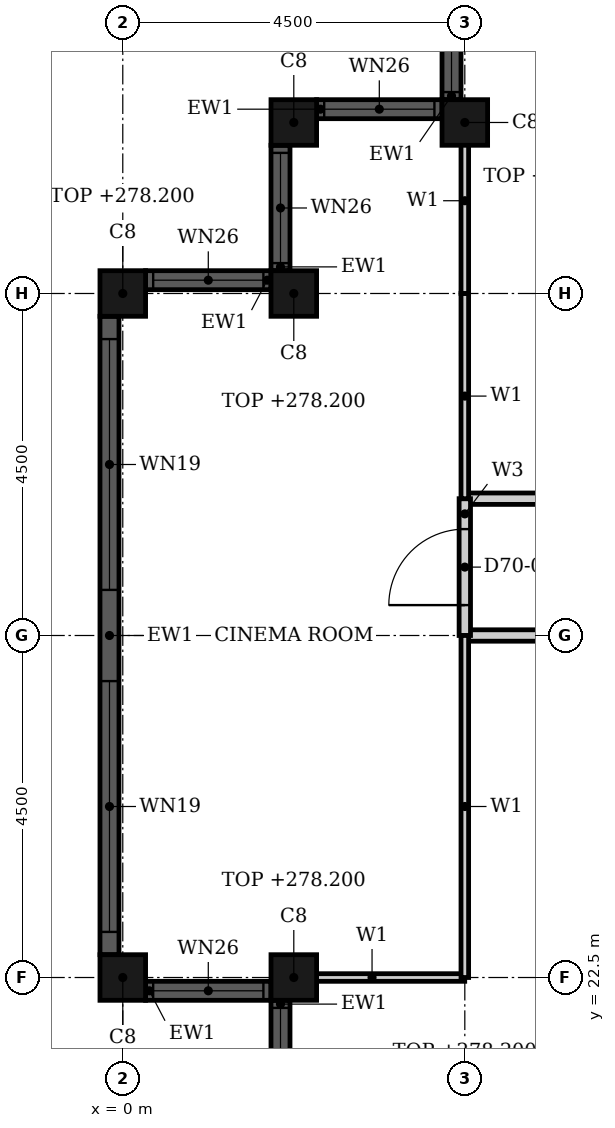
"""IFC4 building model, lengths in metres.
Left out: names, types, materials, properties, quantities, classifications, styles, units other than length and angle.
Written with IfcOpenShell. Run it as: python <this file> out.ifc"""

import sys

from ifc_helpers import new_model, si_unit, direction, frame, frame_2d, origin, origin_2d, place, context, subcontext, project, spatial, rectangle, hollow_rectangle, extrude, element, fill, save


model = new_model("IFC4")
c1 = context("Model", 3, precision=1e-05, world=origin(), true_north=direction((0.0, 1.0)))
c2 = subcontext(c1, "Body", "Model", "MODEL_VIEW")
j1 = project(units=[si_unit("LENGTHUNIT", "METRE"), si_unit("PLANEANGLEUNIT", "RADIAN")], contexts=[c1])
p1 = place(None, origin())
s1 = spatial("IfcSite", under=j1, at=p1, CompositionType="ELEMENT")
p2 = place(p1, origin())
s2 = spatial("IfcBuilding", under=s1, at=p2, CompositionType="ELEMENT")
p3 = place(p2, frame((0.0, 0.0, 274.9)))
s3 = spatial("IfcBuildingStorey", under=s2, at=p3, CompositionType="ELEMENT", Elevation=274.9)
for number, where, z_axis, x_axis in (
    (1, (4.5, 33.75, 0.0), (0.0, 0.0, 1.0), (1.0, 0.0, 0.0)),
    (2, (2.25, 33.75, 0.0), (0.0, 0.0, 1.0), (1.0, 0.0, 0.0)),
    (3, (2.25, 31.5, 0.0), (0.0, 0.0, 1.0), (1.0, 0.0, 0.0)),
    (4, (0.0, 31.5, 0.0), (0.0, 0.0, 1.0), (1.0, 0.0, 0.0)),
    (5, (0.0, 22.5, 0.0), (0.0, 0.0, 1.0), (1.0, 0.0, 0.0)),
    (6, (2.25, 22.5, 0.0), (0.0, 0.0, 1.0), (1.0, 0.0, 0.0)),
):
    element("IfcColumn", number, at=place(p3, frame(where, z_axis=z_axis, x_axis=x_axis)), inside=s3, PredefinedType="COLUMN", context=c2, shape_type="SweptSolid", body=[
        extrude(hollow_rectangle(XDim=0.6, YDim=0.6, WallThickness=0.02, at=origin_2d()), origin(), (0.0, 0.0, 1.0), 3.3),
    ])
p4 = place(p3, frame((4.325, 35.7, 0.0), z_axis=(0.0, 0.0, 1.0), x_axis=(0.0, -1.0, 0.0)))
e7 = element("IfcWall", 7, at=p4, inside=s3, PredefinedType="SOLIDWALL", context=c2, shape_type="SweptSolid", body=[
    extrude(rectangle(XDim=1.65, YDim=0.25, at=frame_2d((0.825, 0.0))), origin(), (0.0, 0.0, 1.0), 3.7),
])
p5 = place(p4, frame((0.1, 0.0, 0.9)))
e8 = element("IfcOpeningElement", 8, at=p5, cuts=e7, PredefinedType="OPENING", context=c2, shape_type="SweptSolid", body=[
    extrude(rectangle(XDim=1.45, YDim=1.75, at=frame_2d((0.725, 0.875))), frame((0.0, 0.135, 0.0), z_axis=(0.0, -1.0, 0.0), x_axis=(1.0, 0.0, 0.0)), (0.0, 0.0, 1.0), 0.27),
])
p6 = place(p3, frame((4.2, 33.925, 0.0), z_axis=(0.0, 0.0, 1.0), x_axis=(-1.0, 0.0, 0.0)))
e9 = element("IfcWall", 9, at=p6, inside=s3, PredefinedType="SOLIDWALL", context=c2, shape_type="SweptSolid", body=[
    extrude(rectangle(XDim=1.65, YDim=0.25, at=frame_2d((0.825, 0.0))), origin(), (0.0, 0.0, 1.0), 3.7),
])
p7 = place(p6, frame((0.1, 0.0, 0.9)))
e10 = element("IfcOpeningElement", 10, at=p7, cuts=e9, PredefinedType="OPENING", context=c2, shape_type="SweptSolid", body=[
    extrude(rectangle(XDim=1.45, YDim=1.75, at=frame_2d((0.725, 0.875))), frame((0.0, 0.135, 0.0), z_axis=(0.0, -1.0, 0.0), x_axis=(1.0, 0.0, 0.0)), (0.0, 0.0, 1.0), 0.27),
])
p8 = place(p3, frame((2.075, 33.45, 0.0), z_axis=(0.0, 0.0, 1.0), x_axis=(0.0, -1.0, 0.0)))
e11 = element("IfcWall", 11, at=p8, inside=s3, PredefinedType="SOLIDWALL", context=c2, shape_type="SweptSolid", body=[
    extrude(rectangle(XDim=1.65, YDim=0.25, at=frame_2d((0.825, 0.0))), origin(), (0.0, 0.0, 1.0), 3.7),
])
p9 = place(p8, frame((0.1, 0.0, 0.9)))
e12 = element("IfcOpeningElement", 12, at=p9, cuts=e11, PredefinedType="OPENING", context=c2, shape_type="SweptSolid", body=[
    extrude(rectangle(XDim=1.45, YDim=1.75, at=frame_2d((0.725, 0.875))), frame((0.0, 0.135, 0.0), z_axis=(0.0, -1.0, 0.0), x_axis=(1.0, 0.0, 0.0)), (0.0, 0.0, 1.0), 0.27),
])
p10 = place(p3, frame((1.95, 31.675, 0.0), z_axis=(0.0, 0.0, 1.0), x_axis=(-1.0, 0.0, 0.0)))
e13 = element("IfcWall", 13, at=p10, inside=s3, PredefinedType="SOLIDWALL", context=c2, shape_type="SweptSolid", body=[
    extrude(rectangle(XDim=1.65, YDim=0.25, at=frame_2d((0.825, 0.0))), origin(), (0.0, 0.0, 1.0), 3.7),
])
p11 = place(p10, frame((0.1, 0.0, 0.9)))
e14 = element("IfcOpeningElement", 14, at=p11, cuts=e13, PredefinedType="OPENING", context=c2, shape_type="SweptSolid", body=[
    extrude(rectangle(XDim=1.45, YDim=1.75, at=frame_2d((0.725, 0.875))), frame((0.0, 0.135, 0.0), z_axis=(0.0, -1.0, 0.0), x_axis=(1.0, 0.0, 0.0)), (0.0, 0.0, 1.0), 0.27),
])
p12 = place(p3, frame((-0.175, 31.2, 0.0), z_axis=(0.0, 0.0, 1.0), x_axis=(0.0, -1.0, 0.0)))
e15 = element("IfcWall", 15, at=p12, inside=s3, PredefinedType="SOLIDWALL", context=c2, shape_type="SweptSolid", body=[
    extrude(rectangle(XDim=8.4, YDim=0.25, at=frame_2d((4.2, 0.0))), origin(), (0.0, 0.0, 1.0), 3.7),
])
p13 = place(p12, frame((0.3, 0.0, 0.45)))
e16 = element("IfcOpeningElement", 16, at=p13, cuts=e15, PredefinedType="OPENING", context=c2, shape_type="SweptSolid", body=[
    extrude(rectangle(XDim=3.3, YDim=2.2, at=frame_2d((1.65, 1.1))), frame((0.0, 0.135, 0.0), z_axis=(0.0, -1.0, 0.0), x_axis=(1.0, 0.0, 0.0)), (0.0, 0.0, 1.0), 0.27),
])
p14 = place(p12, frame((4.8, 0.0, 0.45)))
e17 = element("IfcOpeningElement", 17, at=p14, cuts=e15, PredefinedType="OPENING", context=c2, shape_type="SweptSolid", body=[
    extrude(rectangle(XDim=3.3, YDim=2.2, at=frame_2d((1.65, 1.1))), frame((0.0, 0.135, 0.0), z_axis=(0.0, -1.0, 0.0), x_axis=(1.0, 0.0, 0.0)), (0.0, 0.0, 1.0), 0.27),
])
p15 = place(p3, frame((0.3, 22.325, 0.0), z_axis=(0.0, 0.0, 1.0), x_axis=(1.0, 0.0, 0.0)))
e18 = element("IfcWall", 18, at=p15, inside=s3, PredefinedType="SOLIDWALL", context=c2, shape_type="SweptSolid", body=[
    extrude(rectangle(XDim=1.65, YDim=0.25, at=frame_2d((0.825, 0.0))), origin(), (0.0, 0.0, 1.0), 3.7),
])
p16 = place(p15, frame((0.1, 0.0, 0.9)))
e19 = element("IfcOpeningElement", 19, at=p16, cuts=e18, PredefinedType="OPENING", context=c2, shape_type="SweptSolid", body=[
    extrude(rectangle(XDim=1.45, YDim=1.75, at=frame_2d((0.725, 0.875))), frame((0.0, 0.135, 0.0), z_axis=(0.0, -1.0, 0.0), x_axis=(1.0, 0.0, 0.0)), (0.0, 0.0, 1.0), 0.27),
])
p17 = place(p3, frame((2.075, 22.2, 0.0), z_axis=(0.0, 0.0, 1.0), x_axis=(0.0, -1.0, 0.0)))
e20 = element("IfcWall", 20, at=p17, inside=s3, PredefinedType="SOLIDWALL", context=c2, shape_type="SweptSolid", body=[
    extrude(rectangle(XDim=1.65, YDim=0.25, at=frame_2d((0.825, 0.0))), origin(), (0.0, 0.0, 1.0), 3.7),
])
p18 = place(p17, frame((0.1, 0.0, 0.9)))
e21 = element("IfcOpeningElement", 21, at=p18, cuts=e20, PredefinedType="OPENING", context=c2, shape_type="SweptSolid", body=[
    extrude(rectangle(XDim=1.45, YDim=1.75, at=frame_2d((0.725, 0.875))), frame((0.0, 0.135, 0.0), z_axis=(0.0, -1.0, 0.0), x_axis=(1.0, 0.0, 0.0)), (0.0, 0.0, 1.0), 0.27),
])
p19 = place(p3, frame((4.5, 27.0, 0.0), z_axis=(0.0, 0.0, 1.0), x_axis=(1.0, 0.0, 0.0)))
e22 = element("IfcWall", 22, at=p19, inside=s3, PredefinedType="PARTITIONING", context=c2, shape_type="SweptSolid", body=[
    extrude(rectangle(XDim=13.5, YDim=0.15, at=frame_2d((6.75, 0.0))), origin(), (0.0, 0.0, 1.0), 2.58),
])
p20 = place(p19, frame((5.35, 0.0, 0.0)))
e23 = element("IfcOpeningElement", 23, at=p20, cuts=e22, PredefinedType="OPENING", context=c2, shape_type="SweptSolid", body=[
    extrude(rectangle(XDim=1.0, YDim=2.1, at=frame_2d((0.5, 1.05))), frame((0.0, 0.085, 0.0), z_axis=(0.0, -1.0, 0.0), x_axis=(1.0, 0.0, 0.0)), (0.0, 0.0, 1.0), 0.17),
])
p21 = place(p3, frame((4.5, 28.8, 0.0), z_axis=(0.0, 0.0, 1.0), x_axis=(1.0, 0.0, 0.0)))
e24 = element("IfcWall", 24, at=p21, inside=s3, PredefinedType="PARTITIONING", context=c2, shape_type="SweptSolid", body=[
    extrude(rectangle(XDim=11.699, YDim=0.15, at=frame_2d((5.85, 0.0))), origin(), (0.0, 0.0, 1.0), 3.3),
])
p22 = place(p21, frame((4.0, 0.0, 0.0)))
e25 = element("IfcOpeningElement", 25, at=p22, cuts=e24, PredefinedType="OPENING", context=c2, shape_type="SweptSolid", body=[
    extrude(rectangle(XDim=1.0, YDim=2.1, at=frame_2d((0.5, 1.05))), frame((0.0, 0.085, 0.0), z_axis=(0.0, -1.0, 0.0), x_axis=(1.0, 0.0, 0.0)), (0.0, 0.0, 1.0), 0.17),
])
p23 = place(p3, frame((4.5, 27.0, 0.0), z_axis=(0.0, 0.0, 1.0), x_axis=(0.0, 1.0, 0.0)))
e26 = element("IfcWall", 26, at=p23, inside=s3, PredefinedType="PARTITIONING", context=c2, shape_type="SweptSolid", body=[
    extrude(rectangle(XDim=1.8, YDim=0.15, at=frame_2d((0.9, 0.0))), origin(), (0.0, 0.0, 1.0), 3.3),
])
p24 = place(p23, frame((0.4, 0.0, 0.0)))
e27 = element("IfcOpeningElement", 27, at=p24, cuts=e26, PredefinedType="OPENING", context=c2, shape_type="SweptSolid", body=[
    extrude(rectangle(XDim=1.0, YDim=2.1, at=frame_2d((0.5, 1.05))), frame((0.0, 0.085, 0.0), z_axis=(0.0, -1.0, 0.0), x_axis=(1.0, 0.0, 0.0)), (0.0, 0.0, 1.0), 0.17),
])
p25 = place(p3, frame((2.06, 22.5, 0.0), z_axis=(0.0, 0.0, 1.0), x_axis=(1.0, 0.0, 0.0)))
e28 = element("IfcWall", 28, at=p25, inside=s3, PredefinedType="PARTITIONING", context=c2, shape_type="SweptSolid", body=[
    extrude(rectangle(XDim=2.439, YDim=0.1, at=frame_2d((1.219, 0.0))), origin(), (0.0, 0.0, 1.0), 2.58),
])
p26 = place(p3, frame((4.5, 28.8, 0.0), z_axis=(0.0, 0.0, 1.0), x_axis=(0.0, 1.0, 0.0)))
e29 = element("IfcWall", 29, at=p26, inside=s3, PredefinedType="PARTITIONING", context=c2, shape_type="SweptSolid", body=[
    extrude(rectangle(XDim=2.7, YDim=0.1, at=frame_2d((1.35, 0.0))), origin(), (0.0, 0.0, 1.0), 3.3),
])
p27 = place(p3, frame((4.5, 31.501, 0.0), z_axis=(0.0, 0.0, 1.0), x_axis=(0.0, 1.0, 0.0)))
e30 = element("IfcWall", 30, at=p27, inside=s3, PredefinedType="PARTITIONING", context=c2, shape_type="SweptSolid", body=[
    extrude(rectangle(XDim=2.439, YDim=0.1, at=frame_2d((1.219, 0.0))), origin(), (0.0, 0.0, 1.0), 3.3),
])
p28 = place(p3, frame((4.5, 22.5, 0.0), z_axis=(0.0, 0.0, 1.0), x_axis=(0.0, 1.0, 0.0)))
e31 = element("IfcWall", 31, at=p28, inside=s3, PredefinedType="PARTITIONING", context=c2, shape_type="SweptSolid", body=[
    extrude(rectangle(XDim=4.5, YDim=0.1, at=frame_2d((2.25, 0.0))), origin(), (0.0, 0.0, 1.0), 3.3),
])
p29 = place(p5, origin())
e32 = element("IfcWindow", 32, at=p29, inside=s3, PartitioningType="SINGLE_PANEL", PredefinedType="WINDOW", context=c2, shape_type="SweptSolid", body=[
    extrude(rectangle(XDim=1.45, YDim=1.75, at=frame_2d((0.725, 0.875))), frame((0.0, 0.03, 0.0), z_axis=(0.0, -1.0, 0.0), x_axis=(1.0, 0.0, 0.0)), (0.0, 0.0, 1.0), 0.06),
])
fill(e8, e32)
p30 = place(p7, origin())
e33 = element("IfcWindow", 33, at=p30, inside=s3, PartitioningType="SINGLE_PANEL", PredefinedType="WINDOW", context=c2, shape_type="SweptSolid", body=[
    extrude(rectangle(XDim=1.45, YDim=1.75, at=frame_2d((0.725, 0.875))), frame((0.0, 0.03, 0.0), z_axis=(0.0, -1.0, 0.0), x_axis=(1.0, 0.0, 0.0)), (0.0, 0.0, 1.0), 0.06),
])
fill(e10, e33)
p31 = place(p9, origin())
e34 = element("IfcWindow", 34, at=p31, inside=s3, PartitioningType="SINGLE_PANEL", PredefinedType="WINDOW", context=c2, shape_type="SweptSolid", body=[
    extrude(rectangle(XDim=1.45, YDim=1.75, at=frame_2d((0.725, 0.875))), frame((0.0, 0.03, 0.0), z_axis=(0.0, -1.0, 0.0), x_axis=(1.0, 0.0, 0.0)), (0.0, 0.0, 1.0), 0.06),
])
fill(e12, e34)
p32 = place(p11, origin())
e35 = element("IfcWindow", 35, at=p32, inside=s3, PartitioningType="SINGLE_PANEL", PredefinedType="WINDOW", context=c2, shape_type="SweptSolid", body=[
    extrude(rectangle(XDim=1.45, YDim=1.75, at=frame_2d((0.725, 0.875))), frame((0.0, 0.03, 0.0), z_axis=(0.0, -1.0, 0.0), x_axis=(1.0, 0.0, 0.0)), (0.0, 0.0, 1.0), 0.06),
])
fill(e14, e35)
p33 = place(p13, origin())
e36 = element("IfcWindow", 36, at=p33, inside=s3, PartitioningType="SINGLE_PANEL", PredefinedType="WINDOW", context=c2, shape_type="SweptSolid", body=[
    extrude(rectangle(XDim=3.3, YDim=2.2, at=frame_2d((1.65, 1.1))), frame((0.0, 0.03, 0.0), z_axis=(0.0, -1.0, 0.0), x_axis=(1.0, 0.0, 0.0)), (0.0, 0.0, 1.0), 0.06),
])
fill(e16, e36)
p34 = place(p14, origin())
e37 = element("IfcWindow", 37, at=p34, inside=s3, PartitioningType="SINGLE_PANEL", PredefinedType="WINDOW", context=c2, shape_type="SweptSolid", body=[
    extrude(rectangle(XDim=3.3, YDim=2.2, at=frame_2d((1.65, 1.1))), frame((0.0, 0.03, 0.0), z_axis=(0.0, -1.0, 0.0), x_axis=(1.0, 0.0, 0.0)), (0.0, 0.0, 1.0), 0.06),
])
fill(e17, e37)
p35 = place(p16, origin())
e38 = element("IfcWindow", 38, at=p35, inside=s3, PartitioningType="SINGLE_PANEL", PredefinedType="WINDOW", context=c2, shape_type="SweptSolid", body=[
    extrude(rectangle(XDim=1.45, YDim=1.75, at=frame_2d((0.725, 0.875))), frame((0.0, 0.03, 0.0), z_axis=(0.0, -1.0, 0.0), x_axis=(1.0, 0.0, 0.0)), (0.0, 0.0, 1.0), 0.06),
])
fill(e19, e38)
p36 = place(p18, origin())
e39 = element("IfcWindow", 39, at=p36, inside=s3, PartitioningType="SINGLE_PANEL", PredefinedType="WINDOW", context=c2, shape_type="SweptSolid", body=[
    extrude(rectangle(XDim=1.45, YDim=1.75, at=frame_2d((0.725, 0.875))), frame((0.0, 0.03, 0.0), z_axis=(0.0, -1.0, 0.0), x_axis=(1.0, 0.0, 0.0)), (0.0, 0.0, 1.0), 0.06),
])
fill(e21, e39)
p37 = place(p24, origin())
e40 = element("IfcDoor", 40, at=p37, inside=s3, OperationType="SINGLE_SWING_RIGHT", PredefinedType="DOOR", context=c2, shape_type="SweptSolid", body=[
    extrude(rectangle(XDim=1.0, YDim=2.1, at=frame_2d((0.5, 1.05))), frame((0.0, 0.025, 0.0), z_axis=(0.0, -1.0, 0.0), x_axis=(1.0, 0.0, 0.0)), (0.0, 0.0, 1.0), 0.05),
])
fill(e27, e40)
save(model, sys.argv[1])
